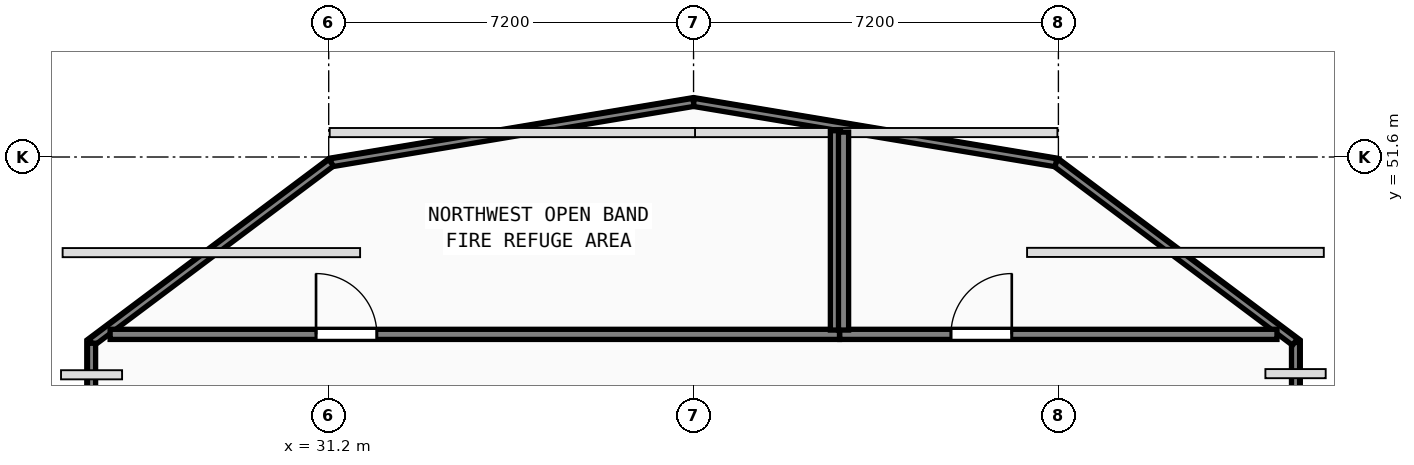
"""IFC4 building model, lengths in metres.
Left out: names, types, materials, properties, quantities, classifications, styles, units other than length and angle.
Written with IfcOpenShell. Run it as: python <this file> out.ifc"""

import sys

from ifc_helpers import new_model, si_unit, direction, frame, frame_2d, origin, origin_2d, place, context, subcontext, project, spatial, rectangle, hollow_rectangle, extrude, element, fill, save


model = new_model("IFC4")
c1 = context("Model", 3, precision=1e-05, world=origin(), true_north=direction((0.0, 1.0)))
c2 = subcontext(c1, "Body", "Model", "MODEL_VIEW")
j1 = project(units=[si_unit("LENGTHUNIT", "METRE"), si_unit("PLANEANGLEUNIT", "RADIAN")], contexts=[c1])
p1 = place(None, origin())
s1 = spatial("IfcSite", under=j1, at=p1, CompositionType="ELEMENT")
p2 = place(p1, origin())
s2 = spatial("IfcBuilding", under=s1, at=p2, CompositionType="ELEMENT")
p3 = place(p2, frame((0.0, 0.0, 89.4)))
s3 = spatial("IfcBuildingStorey", under=s2, at=p3, CompositionType="ELEMENT", Elevation=89.4)
for number, where, z_axis, x_axis in (
    (1, (31.2, 50.4, 0.0), (0.0, 0.0, 1.0), (1.0, 0.0, 0.0)),
    (2, (45.6, 50.4, 0.0), (0.0, 0.0, 1.0), (1.0, 0.0, 0.0)),
):
    element("IfcColumn", number, at=place(p3, frame(where, z_axis=z_axis, x_axis=x_axis)), inside=s3, PredefinedType="COLUMN", context=c2, shape_type="SweptSolid", body=[
        extrude(hollow_rectangle(XDim=1.15, YDim=1.15, WallThickness=0.042, at=origin_2d()), origin(), (0.0, 0.0, 1.0), 4.6),
    ])
p4 = place(p3, frame((38.4, 50.4, 0.0), z_axis=(0.0, 0.0, 1.0), x_axis=(1.0, 0.0, 0.0)))
e3 = element("IfcColumn", 3, at=p4, inside=s3, PredefinedType="COLUMN", context=c2, shape_type="SweptSolid", body=[
    extrude(hollow_rectangle(XDim=1.0, YDim=1.0, WallThickness=0.038, at=origin_2d()), origin(), (0.0, 0.0, 1.0), 4.6),
])
p5 = place(p3, frame((50.28, 46.71, 0.0), z_axis=(0.0, 0.0, 1.0), x_axis=(0.0, 1.0, 0.0)))
e4 = element("IfcWall", 4, at=p5, inside=s3, PredefinedType="PARAPET", context=c2, shape_type="SweptSolid", body=[
    extrude(rectangle(XDim=1.23, YDim=0.16, at=frame_2d((0.615, 0.0))), origin(), (0.0, 0.0, 1.0), 1.15),
])
p6 = place(p3, frame((50.268, 47.949, 0.0), z_axis=(0.0, 0.0, 1.0), x_axis=(-0.800004969205, 0.599993374337, 0.0)))
e5 = element("IfcWall", 5, at=p6, inside=s3, PredefinedType="PARAPET", context=c2, shape_type="SweptSolid", body=[
    extrude(rectangle(XDim=5.896, YDim=0.16, at=frame_2d((2.948, 0.0))), origin(), (0.0, 0.0, 1.0), 1.15),
])
p7 = place(p3, frame((45.552, 51.486, 0.0), z_axis=(0.0, 0.0, 1.0), x_axis=(-0.986394833909, 0.164393526752, 0.0)))
e6 = element("IfcWall", 6, at=p7, inside=s3, PredefinedType="PARAPET", context=c2, shape_type="SweptSolid", body=[
    extrude(rectangle(XDim=7.25, YDim=0.16, at=frame_2d((3.625, 0.0))), origin(), (0.0, 0.0, 1.0), 1.15),
])
p8 = place(p3, frame((38.4, 52.678, 0.0), z_axis=(0.0, 0.0, 1.0), x_axis=(-0.986393923832, -0.164398987305, 0.0)))
e7 = element("IfcWall", 7, at=p8, inside=s3, PredefinedType="PARAPET", context=c2, shape_type="SweptSolid", body=[
    extrude(rectangle(XDim=7.25, YDim=0.16, at=frame_2d((3.625, 0.0))), origin(), (0.0, 0.0, 1.0), 1.15),
])
p9 = place(p3, frame((31.249, 51.486, 0.0), z_axis=(0.0, 0.0, 1.0), x_axis=(-0.8, -0.6, 0.0)))
e8 = element("IfcWall", 8, at=p9, inside=s3, PredefinedType="PARAPET", context=c2, shape_type="SweptSolid", body=[
    extrude(rectangle(XDim=5.911, YDim=0.16, at=frame_2d((2.955, 0.0))), origin(), (0.0, 0.0, 1.0), 1.15),
])
p10 = place(p3, frame((26.52, 47.925, 0.0), z_axis=(0.0, 0.0, 1.0), x_axis=(0.0, -1.0, 0.0)))
e9 = element("IfcWall", 9, at=p10, inside=s3, PredefinedType="PARAPET", context=c2, shape_type="SweptSolid", body=[
    extrude(rectangle(XDim=1.245, YDim=0.16, at=frame_2d((0.623, 0.0))), origin(), (0.0, 0.0, 1.0), 1.15),
])
p11 = place(p3, frame((26.887, 48.1, 0.0), z_axis=(0.0, 0.0, 1.0), x_axis=(1.0, 0.0, 0.0)))
e10 = element("IfcWall", 10, at=p11, inside=s3, PredefinedType="SOLIDWALL", context=c2, shape_type="SweptSolid", body=[
    extrude(rectangle(XDim=14.393, YDim=0.2, at=frame_2d((7.197, 0.0))), origin(), (0.0, 0.0, 1.0), 4.35),
])
p12 = place(p11, frame((4.063, 0.0, 0.0)))
e11 = element("IfcOpeningElement", 11, at=p12, cuts=e10, PredefinedType="OPENING", context=c2, shape_type="SweptSolid", body=[
    extrude(rectangle(XDim=1.2, YDim=2.15, at=frame_2d((0.6, 1.075))), frame((0.0, 0.11, 0.0), z_axis=(0.0, -1.0, 0.0), x_axis=(1.0, 0.0, 0.0)), (0.0, 0.0, 1.0), 0.22),
])
p13 = place(p3, frame((41.2, 48.185, 0.0), z_axis=(0.0, 0.0, 1.0), x_axis=(0.0, 1.0, 0.0)))
e12 = element("IfcWall", 12, at=p13, inside=s3, PredefinedType="SOLIDWALL", context=c2, shape_type="SweptSolid", body=[
    extrude(rectangle(XDim=3.933, YDim=0.2, at=frame_2d((1.967, 0.0))), origin(), (0.0, 0.0, 1.0), 4.35),
])
p14 = place(p3, frame((41.285, 48.1, 0.0), z_axis=(0.0, 0.0, 1.0), x_axis=(1.0, 0.0, 0.0)))
e13 = element("IfcWall", 13, at=p14, inside=s3, PredefinedType="SOLIDWALL", context=c2, shape_type="SweptSolid", body=[
    extrude(rectangle(XDim=8.628, YDim=0.2, at=frame_2d((4.314, 0.0))), origin(), (0.0, 0.0, 1.0), 4.35),
])
p15 = place(p14, frame((2.195, 0.0, 0.0)))
e14 = element("IfcOpeningElement", 14, at=p15, cuts=e13, PredefinedType="OPENING", context=c2, shape_type="SweptSolid", body=[
    extrude(rectangle(XDim=1.2, YDim=2.15, at=frame_2d((0.6, 1.075))), frame((0.0, 0.11, 0.0), z_axis=(0.0, -1.0, 0.0), x_axis=(1.0, 0.0, 0.0)), (0.0, 0.0, 1.0), 0.22),
])
p16 = place(p3, frame((41.36, 48.185, 0.0), z_axis=(0.0, 0.0, 1.0), x_axis=(0.0, 1.0, 0.0)))
e15 = element("IfcWall", 15, at=p16, inside=s3, PredefinedType="SOLIDWALL", context=c2, shape_type="SweptSolid", body=[
    extrude(rectangle(XDim=3.907, YDim=0.2, at=frame_2d((1.953, 0.0))), origin(), (0.0, 0.0, 1.0), 4.35),
])
p17 = place(p12, origin())
e16 = element("IfcDoor", 16, at=p17, inside=s3, OperationType="SINGLE_SWING_LEFT", PredefinedType="DOOR", context=c2, shape_type="SweptSolid", body=[
    extrude(rectangle(XDim=1.2, YDim=2.15, at=frame_2d((0.6, 1.075))), frame((0.0, 0.025, 0.0), z_axis=(0.0, -1.0, 0.0), x_axis=(1.0, 0.0, 0.0)), (0.0, 0.0, 1.0), 0.05),
])
fill(e11, e16)
p18 = place(p15, origin())
e17 = element("IfcDoor", 17, at=p18, inside=s3, OperationType="SINGLE_SWING_RIGHT", PredefinedType="DOOR", context=c2, shape_type="SweptSolid", body=[
    extrude(rectangle(XDim=1.2, YDim=2.15, at=frame_2d((0.6, 1.075))), frame((0.0, 0.025, 0.0), z_axis=(0.0, -1.0, 0.0), x_axis=(1.0, 0.0, 0.0)), (0.0, 0.0, 1.0), 0.05),
])
fill(e14, e17)
save(model, sys.argv[1])
